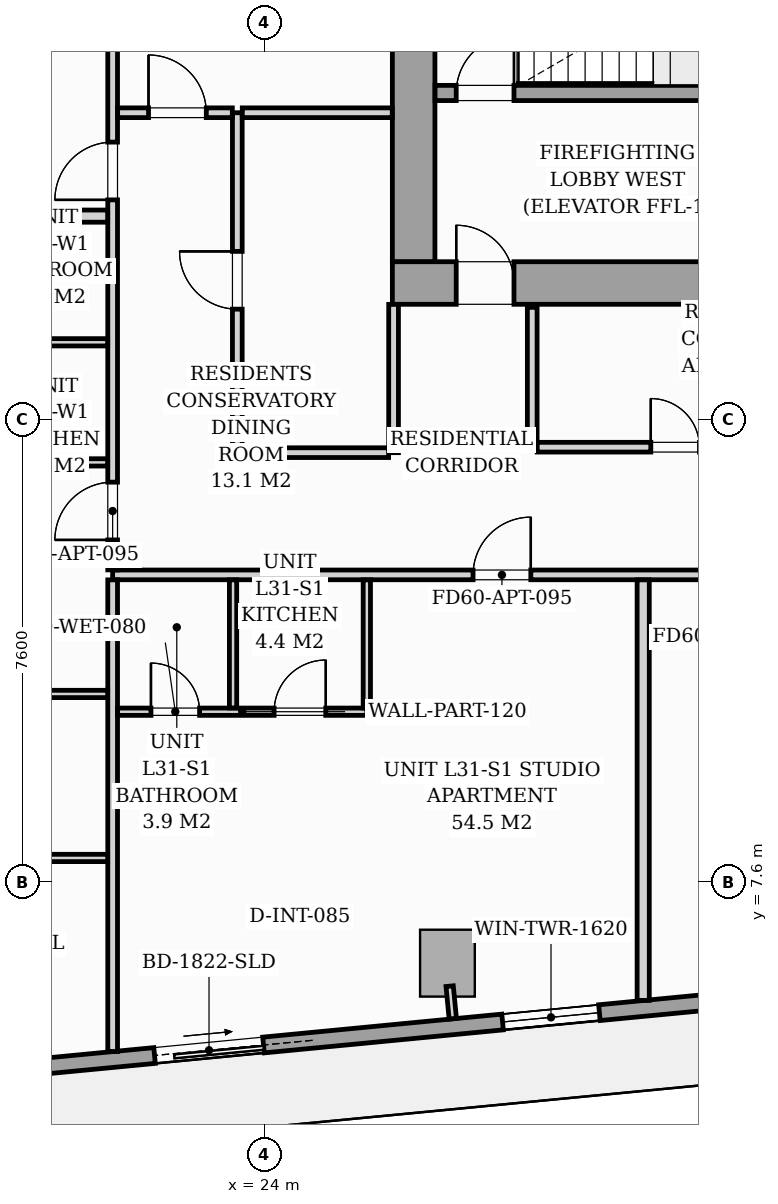
"""IFC4 building model, lengths in metres.
Left out: names, types, materials, properties, quantities, classifications, styles, units other than length and angle.
Written with IfcOpenShell. Run it as: python <this file> out.ifc"""

import sys

from ifc_helpers import new_model, si_unit, direction, frame, frame_2d, origin, origin_2d, place, context, subcontext, project, spatial, rectangle, i_section, extrude, source, transform, mapped, element, fill, save


model = new_model("IFC4")
c1 = context("Model", 3, precision=1e-05, world=origin(), true_north=direction((0.0, 1.0)))
c2 = subcontext(c1, "Body", "Model", "MODEL_VIEW")
j1 = project(units=[si_unit("LENGTHUNIT", "METRE"), si_unit("PLANEANGLEUNIT", "RADIAN")], contexts=[c1])
p1 = place(None, origin())
s1 = spatial("IfcSite", under=j1, at=p1, CompositionType="ELEMENT")
p2 = place(p1, origin())
s2 = spatial("IfcBuilding", under=s1, at=p2, CompositionType="ELEMENT")
p3 = place(p2, frame((0.0, 0.0, 109.8)))
s3 = spatial("IfcBuildingStorey", under=s2, at=p3, CompositionType="ELEMENT", Elevation=109.8)
m1 = source(origin(), c2, "Body", "SweptSolid", [
    extrude(i_section(OverallWidth=0.427, OverallDepth=0.483, WebThickness=0.051, FlangeThickness=0.082, FilletRadius=0.018, at=origin_2d()), origin(), (0.0, 0.0, 1.0), 3.196),
])
p4 = place(p3, frame((26.4, 17.4, 0.002), z_axis=(0.0, 0.0, 1.0), x_axis=(1.0, 0.0, 0.0)))
e1 = element("IfcColumn", 1, at=p4, inside=s3, PredefinedType="PILASTER", context=c2, shape_type="MappedRepresentation", body=[
    mapped(m1, transform((0.0, 0.0, 0.0), scale=1.0)),
])
m2 = source(origin(), c2, "Body", "SweptSolid", [
    extrude(rectangle(XDim=0.9, YDim=1.1, at=origin_2d()), origin(), (0.0, 0.0, 1.0), 3.196),
])
p5 = place(p3, frame((27.006, 6.265, 0.002), z_axis=(0.0, 0.0, 1.0), x_axis=(0.995396198367, 0.09584575252, 0.0)))
e2 = element("IfcColumn", 2, at=p5, inside=s3, PredefinedType="COLUMN", context=c2, shape_type="MappedRepresentation", body=[
    mapped(m2, transform((0.0, 0.0, 0.0), scale=1.0)),
])
p6 = place(p3, frame((31.994, 5.69, 0.0), z_axis=(0.0, 0.0, 1.0), x_axis=(-0.995396521236, -0.095842399342, 0.0)))
e3 = element("IfcWall", 3, at=p6, inside=s3, PredefinedType="STANDARD", context=c2, shape_type="SweptSolid", body=[
    extrude(rectangle(XDim=19.11, YDim=0.26, at=frame_2d((9.555, 0.0))), origin(), (0.0, 0.0, 1.0), 2.94),
])
p7 = place(p6, frame((8.05, 0.0, 0.0)))
e4 = element("IfcOpeningElement", 4, at=p7, cuts=e3, PredefinedType="OPENING", context=c2, shape_type="SweptSolid", body=[
    extrude(rectangle(XDim=1.8, YDim=2.06, at=frame_2d((0.9, 1.03))), frame((0.0, 0.14, 0.0), z_axis=(0.0, -1.0, 0.0), x_axis=(1.0, 0.0, 0.0)), (0.0, 0.0, 1.0), 0.28),
])
p8 = place(p6, frame((2.5, 0.0, 0.65)))
e5 = element("IfcOpeningElement", 5, at=p8, cuts=e3, PredefinedType="OPENING", context=c2, shape_type="SweptSolid", body=[
    extrude(rectangle(XDim=1.6, YDim=1.5, at=frame_2d((0.8, 0.75))), frame((0.0, 0.14, 0.0), z_axis=(0.0, -1.0, 0.0), x_axis=(1.0, 0.0, 0.0)), (0.0, 0.0, 1.0), 0.28),
])
p9 = place(p3, frame((26.1, 17.45, 0.0), z_axis=(0.0, 0.0, 1.0), x_axis=(1.0, 0.0, 0.0)))
e6 = element("IfcWall", 6, at=p9, inside=s3, PredefinedType="SHEAR", context=c2, shape_type="SweptSolid", body=[
    extrude(rectangle(XDim=19.8, YDim=0.7, at=frame_2d((9.9, 0.0))), origin(), (0.0, 0.0, 1.0), 3.2),
])
p10 = place(p9, frame((1.05, 0.0, 0.0)))
e7 = element("IfcOpeningElement", 7, at=p10, cuts=e6, PredefinedType="OPENING", context=c2, shape_type="SweptSolid", body=[
    extrude(rectangle(XDim=0.95, YDim=2.06, at=frame_2d((0.475, 1.03))), frame((0.0, 0.36, 0.0), z_axis=(0.0, -1.0, 0.0), x_axis=(1.0, 0.0, 0.0)), (0.0, 0.0, 1.0), 0.72),
])
p11 = place(p9, frame((9.48, 0.0, 0.0)))
e8 = element("IfcOpeningElement", 8, at=p11, cuts=e6, PredefinedType="OPENING", context=c2, shape_type="SweptSolid", body=[
    extrude(rectangle(XDim=0.85, YDim=2.0, at=frame_2d((0.425, 1.0))), frame((0.0, 0.36, 0.0), z_axis=(0.0, -1.0, 0.0), x_axis=(1.0, 0.0, 0.0)), (0.0, 0.0, 1.0), 0.72),
])
p12 = place(p9, frame((17.65, 0.0, 0.0)))
e9 = element("IfcOpeningElement", 9, at=p12, cuts=e6, PredefinedType="OPENING", context=c2, shape_type="SweptSolid", body=[
    extrude(rectangle(XDim=0.95, YDim=2.06, at=frame_2d((0.475, 1.03))), frame((0.0, 0.36, 0.0), z_axis=(0.0, -1.0, 0.0), x_axis=(1.0, 0.0, 0.0)), (0.0, 0.0, 1.0), 0.72),
])
p13 = place(p3, frame((26.45, 17.802, 0.0), z_axis=(0.0, 0.0, 1.0), x_axis=(0.0, 1.0, 0.0)))
e10 = element("IfcWall", 10, at=p13, inside=s3, PredefinedType="SHEAR", context=c2, shape_type="SweptSolid", body=[
    extrude(rectangle(XDim=5.796, YDim=0.7, at=frame_2d((2.898, 0.0))), origin(), (0.0, 0.0, 1.0), 3.2),
])
p14 = place(p3, frame((26.802, 20.575, 0.0), z_axis=(0.0, 0.0, 1.0), x_axis=(1.0, 0.0, 0.0)))
e11 = element("IfcWall", 11, at=p14, inside=s3, PredefinedType="SOLIDWALL", context=c2, shape_type="SweptSolid", body=[
    extrude(rectangle(XDim=8.148, YDim=0.25, at=frame_2d((4.074, 0.0))), origin(), (0.0, 0.0, 1.0), 3.2),
])
p15 = place(p14, frame((0.348, 0.0, 0.0)))
e12 = element("IfcOpeningElement", 12, at=p15, cuts=e11, PredefinedType="OPENING", context=c2, shape_type="SweptSolid", body=[
    extrude(rectangle(XDim=0.95, YDim=2.06, at=frame_2d((0.475, 1.03))), frame((0.0, 0.135, 0.0), z_axis=(0.0, -1.0, 0.0), x_axis=(1.0, 0.0, 0.0)), (0.0, 0.0, 1.0), 0.27),
])
p16 = place(p3, frame((28.4, 14.75, 0.0), z_axis=(0.0, 0.0, 1.0), x_axis=(0.0, 1.0, 0.0)))
e13 = element("IfcWall", 13, at=p16, inside=s3, PredefinedType="PARTITIONING", context=c2, shape_type="SweptSolid", body=[
    extrude(rectangle(XDim=2.3, YDim=0.16, at=frame_2d((1.15, 0.0))), origin(), (0.0, 0.0, 1.0), 2.94),
])
p17 = place(p3, frame((28.482, 14.75, 0.0), z_axis=(0.0, 0.0, 1.0), x_axis=(1.0, 0.0, 0.0)))
e14 = element("IfcWall", 14, at=p17, inside=s3, PredefinedType="PARTITIONING", context=c2, shape_type="SweptSolid", body=[
    extrude(rectangle(XDim=4.516, YDim=0.16, at=frame_2d((2.258, 0.0))), origin(), (0.0, 0.0, 1.0), 2.94),
])
p18 = place(p17, frame((1.868, 0.0, 0.0)))
e15 = element("IfcOpeningElement", 15, at=p18, cuts=e14, PredefinedType="OPENING", context=c2, shape_type="SweptSolid", body=[
    extrude(rectangle(XDim=0.8, YDim=2.05, at=frame_2d((0.4, 1.025))), frame((0.0, 0.09, 0.0), z_axis=(0.0, -1.0, 0.0), x_axis=(1.0, 0.0, 0.0)), (0.0, 0.0, 1.0), 0.18),
])
p19 = place(p3, frame((21.5, 12.65, 0.0), z_axis=(0.0, 0.0, 1.0), x_axis=(1.0, 0.0, 0.0)))
e16 = element("IfcWall", 16, at=p19, inside=s3, PredefinedType="PARTITIONING", context=c2, shape_type="SweptSolid", body=[
    extrude(rectangle(XDim=26.2, YDim=0.16, at=frame_2d((13.1, 0.0))), origin(), (0.0, 0.0, 1.0), 2.94),
])
p20 = place(p19, frame((5.927, 0.0, 0.0)))
e17 = element("IfcOpeningElement", 17, at=p20, cuts=e16, PredefinedType="OPENING", context=c2, shape_type="SweptSolid", body=[
    extrude(rectangle(XDim=0.95, YDim=2.06, at=frame_2d((0.475, 1.03))), frame((0.0, 0.09, 0.0), z_axis=(0.0, -1.0, 0.0), x_axis=(1.0, 0.0, 0.0)), (0.0, 0.0, 1.0), 0.18),
])
p21 = place(p19, frame((10.575, 0.0, 0.0)))
e18 = element("IfcOpeningElement", 18, at=p21, cuts=e16, PredefinedType="OPENING", context=c2, shape_type="SweptSolid", body=[
    extrude(rectangle(XDim=0.95, YDim=2.06, at=frame_2d((0.475, 1.03))), frame((0.0, 0.09, 0.0), z_axis=(0.0, -1.0, 0.0), x_axis=(1.0, 0.0, 0.0)), (0.0, 0.0, 1.0), 0.18),
])
p22 = place(p19, frame((19.322, 0.0, 0.0)))
e19 = element("IfcOpeningElement", 19, at=p22, cuts=e16, PredefinedType="OPENING", context=c2, shape_type="SweptSolid", body=[
    extrude(rectangle(XDim=0.95, YDim=2.06, at=frame_2d((0.475, 1.03))), frame((0.0, 0.09, 0.0), z_axis=(0.0, -1.0, 0.0), x_axis=(1.0, 0.0, 0.0)), (0.0, 0.0, 1.0), 0.18),
])
p23 = place(p3, frame((21.5, 4.812, 0.0), z_axis=(0.0, 0.0, 1.0), x_axis=(0.0, 1.0, 0.0)))
e20 = element("IfcWall", 20, at=p23, inside=s3, PredefinedType="PARTITIONING", context=c2, shape_type="SweptSolid", body=[
    extrude(rectangle(XDim=7.756, YDim=0.16, at=frame_2d((3.878, 0.0))), origin(), (0.0, 0.0, 1.0), 2.94),
])
p24 = place(p3, frame((21.5, 12.732, 0.0), z_axis=(0.0, 0.0, 1.0), x_axis=(0.0, 1.0, 0.0)))
e21 = element("IfcWall", 21, at=p24, inside=s3, PredefinedType="PARTITIONING", context=c2, shape_type="SweptSolid", body=[
    extrude(rectangle(XDim=11.647, YDim=0.16, at=frame_2d((5.823, 0.0))), origin(), (0.0, 0.0, 1.0), 2.94),
])
p25 = place(p24, frame((0.493, 0.0, 0.0)))
e22 = element("IfcOpeningElement", 22, at=p25, cuts=e21, PredefinedType="OPENING", context=c2, shape_type="SweptSolid", body=[
    extrude(rectangle(XDim=0.95, YDim=2.06, at=frame_2d((0.475, 1.03))), frame((0.0, 0.09, 0.0), z_axis=(0.0, -1.0, 0.0), x_axis=(1.0, 0.0, 0.0)), (0.0, 0.0, 1.0), 0.18),
])
p26 = place(p24, frame((6.085, 0.0, 0.0)))
e23 = element("IfcOpeningElement", 23, at=p26, cuts=e21, PredefinedType="OPENING", context=c2, shape_type="SweptSolid", body=[
    extrude(rectangle(XDim=0.95, YDim=2.06, at=frame_2d((0.475, 1.03))), frame((0.0, 0.09, 0.0), z_axis=(0.0, -1.0, 0.0), x_axis=(1.0, 0.0, 0.0)), (0.0, 0.0, 1.0), 0.18),
])
p27 = place(p3, frame((21.582, 10.4, 0.0), z_axis=(0.0, 0.0, 1.0), x_axis=(1.0, 0.0, 0.0)))
e24 = element("IfcWall", 24, at=p27, inside=s3, PredefinedType="PARTITIONING", context=c2, shape_type="SweptSolid", body=[
    extrude(rectangle(XDim=4.098, YDim=0.12, at=frame_2d((2.049, 0.0))), origin(), (0.0, 0.0, 1.0), 2.94),
])
p28 = place(p27, frame((0.548, 0.0, 0.0)))
e25 = element("IfcOpeningElement", 25, at=p28, cuts=e24, PredefinedType="OPENING", context=c2, shape_type="SweptSolid", body=[
    extrude(rectangle(XDim=0.8, YDim=2.02, at=frame_2d((0.4, 1.01))), frame((0.0, 0.07, 0.0), z_axis=(0.0, -1.0, 0.0), x_axis=(1.0, 0.0, 0.0)), (0.0, 0.0, 1.0), 0.14),
])
p29 = place(p27, frame((2.573, 0.0, 0.0)))
e26 = element("IfcOpeningElement", 26, at=p29, cuts=e24, PredefinedType="OPENING", context=c2, shape_type="SweptSolid", body=[
    extrude(rectangle(XDim=0.85, YDim=2.05, at=frame_2d((0.425, 1.025))), frame((0.0, 0.07, 0.0), z_axis=(0.0, -1.0, 0.0), x_axis=(1.0, 0.0, 0.0)), (0.0, 0.0, 1.0), 0.14),
])
for number, where, z_axis, x_axis in (
    (27, (25.68, 10.462, 0.0), (0.0, 0.0, 1.0), (0.0, 1.0, 0.0)),
    (28, (23.48, 10.462, 0.0), (0.0, 0.0, 1.0), (0.0, 1.0, 0.0)),
):
    element("IfcWall", number, at=place(p3, frame(where, z_axis=z_axis, x_axis=x_axis)), inside=s3, PredefinedType="PARTITIONING", context=c2, shape_type="SweptSolid", body=[
        extrude(rectangle(XDim=2.106, YDim=0.12, at=frame_2d((1.053, 0.0))), origin(), (0.0, 0.0, 1.0), 2.94),
    ])
p30 = place(p3, frame((30.225, 5.653, 0.0), z_axis=(0.0, 0.0, 1.0), x_axis=(0.0, 1.0, 0.0)))
e29 = element("IfcWall", 29, at=p30, inside=s3, PredefinedType="PARTITIONING", context=c2, shape_type="SweptSolid", body=[
    extrude(rectangle(XDim=6.916, YDim=0.2, at=frame_2d((3.458, 0.0))), origin(), (0.0, 0.0, 1.0), 2.94),
])
p31 = place(p3, frame((9.126, 18.55, 0.0), z_axis=(0.0, 0.0, 1.0), x_axis=(1.0, 0.0, 0.0)))
e30 = element("IfcWall", 30, at=p31, inside=s3, PredefinedType="PARTITIONING", context=c2, shape_type="SweptSolid", body=[
    extrude(rectangle(XDim=12.292, YDim=0.2, at=frame_2d((6.146, 0.0))), origin(), (0.0, 0.0, 1.0), 2.94),
])
for number, where, z_axis, x_axis in (
    (31, (19.162, 16.475, 0.0), (0.0, 0.0, 1.0), (1.0, 0.0, 0.0)),
    (32, (19.162, 14.5, 0.0), (0.0, 0.0, 1.0), (1.0, 0.0, 0.0)),
):
    element("IfcWall", number, at=place(p3, frame(where, z_axis=z_axis, x_axis=x_axis)), inside=s3, PredefinedType="PARTITIONING", context=c2, shape_type="SweptSolid", body=[
        extrude(rectangle(XDim=2.256, YDim=0.12, at=frame_2d((1.128, 0.0))), origin(), (0.0, 0.0, 1.0), 2.94),
    ])
p32 = place(p3, frame((12.377, 7.995, 0.0), z_axis=(0.0, 0.0, 1.0), x_axis=(1.0, 0.0, 0.0)))
e33 = element("IfcWall", 33, at=p32, inside=s3, PredefinedType="PARTITIONING", context=c2, shape_type="SweptSolid", body=[
    extrude(rectangle(XDim=9.041, YDim=0.12, at=frame_2d((4.521, 0.0))), origin(), (0.0, 0.0, 1.0), 2.94),
])
p33 = place(p32, frame((4.096, 0.0, 0.0)))
e34 = element("IfcOpeningElement", 34, at=p33, cuts=e33, PredefinedType="OPENING", context=c2, shape_type="SweptSolid", body=[
    extrude(rectangle(XDim=0.85, YDim=2.05, at=frame_2d((0.425, 1.025))), frame((0.0, 0.07, 0.0), z_axis=(0.0, -1.0, 0.0), x_axis=(1.0, 0.0, 0.0)), (0.0, 0.0, 1.0), 0.14),
])
p34 = place(p3, frame((12.377, 10.692, 0.0), z_axis=(0.0, 0.0, 1.0), x_axis=(1.0, 0.0, 0.0)))
e35 = element("IfcWall", 35, at=p34, inside=s3, PredefinedType="PARTITIONING", context=c2, shape_type="SweptSolid", body=[
    extrude(rectangle(XDim=9.041, YDim=0.12, at=frame_2d((4.521, 0.0))), origin(), (0.0, 0.0, 1.0), 2.94),
])
p35 = place(p34, frame((4.096, 0.0, 0.0)))
e36 = element("IfcOpeningElement", 36, at=p35, cuts=e35, PredefinedType="OPENING", context=c2, shape_type="SweptSolid", body=[
    extrude(rectangle(XDim=0.85, YDim=2.05, at=frame_2d((0.425, 1.025))), frame((0.0, 0.07, 0.0), z_axis=(0.0, -1.0, 0.0), x_axis=(1.0, 0.0, 0.0)), (0.0, 0.0, 1.0), 0.14),
])
p36 = place(p3, frame((23.55, 14.66, 0.0), z_axis=(0.0, 0.0, 1.0), x_axis=(0.0, 1.0, 0.0)))
e37 = element("IfcWall", 37, at=p36, inside=s3, PredefinedType="PARTITIONING", context=c2, shape_type="SweptSolid", body=[
    extrude(rectangle(XDim=5.59, YDim=0.16, at=frame_2d((2.795, 0.0))), origin(), (0.0, 0.0, 1.0), 2.94),
])
p37 = place(p36, frame((2.36, 0.0, 0.0)))
e38 = element("IfcOpeningElement", 38, at=p37, cuts=e37, PredefinedType="OPENING", context=c2, shape_type="SweptSolid", body=[
    extrude(rectangle(XDim=0.95, YDim=2.06, at=frame_2d((0.475, 1.03))), frame((0.0, 0.09, 0.0), z_axis=(0.0, -1.0, 0.0), x_axis=(1.0, 0.0, 0.0)), (0.0, 0.0, 1.0), 0.18),
])
p38 = place(p3, frame((21.582, 20.25, 0.0), z_axis=(0.0, 0.0, 1.0), x_axis=(1.0, 0.0, 0.0)))
e39 = element("IfcWall", 39, at=p38, inside=s3, PredefinedType="PARTITIONING", context=c2, shape_type="SweptSolid", body=[
    extrude(rectangle(XDim=1.886, YDim=0.16, at=frame_2d((0.943, 0.0))), origin(), (0.0, 0.0, 1.0), 2.94),
])
p39 = place(p38, frame((0.508, 0.0, 0.0)))
e40 = element("IfcOpeningElement", 40, at=p39, cuts=e39, PredefinedType="OPENING", context=c2, shape_type="SweptSolid", body=[
    extrude(rectangle(XDim=0.95, YDim=2.06, at=frame_2d((0.475, 1.03))), frame((0.0, 0.09, 0.0), z_axis=(0.0, -1.0, 0.0), x_axis=(1.0, 0.0, 0.0)), (0.0, 0.0, 1.0), 0.18),
])
p40 = place(p3, frame((23.632, 20.25, 0.0), z_axis=(0.0, 0.0, 1.0), x_axis=(1.0, 0.0, 0.0)))
e41 = element("IfcWall", 41, at=p40, inside=s3, PredefinedType="PARTITIONING", context=c2, shape_type="SweptSolid", body=[
    extrude(rectangle(XDim=2.466, YDim=0.16, at=frame_2d((1.233, 0.0))), origin(), (0.0, 0.0, 1.0), 2.94),
])
p41 = place(p3, frame((26.12, 14.66, 0.0), z_axis=(0.0, 0.0, 1.0), x_axis=(0.0, 1.0, 0.0)))
e42 = element("IfcWall", 42, at=p41, inside=s3, PredefinedType="PARTITIONING", context=c2, shape_type="SweptSolid", body=[
    extrude(rectangle(XDim=2.438, YDim=0.16, at=frame_2d((1.219, 0.0))), origin(), (0.0, 0.0, 1.0), 2.94),
])
p42 = place(p3, frame((23.632, 14.66, 0.0), z_axis=(0.0, 0.0, 1.0), x_axis=(1.0, 0.0, 0.0)))
e43 = element("IfcWall", 43, at=p42, inside=s3, PredefinedType="PARTITIONING", context=c2, shape_type="SweptSolid", body=[
    extrude(rectangle(XDim=2.406, YDim=0.16, at=frame_2d((1.203, 0.0))), origin(), (0.0, 0.0, 1.0), 2.94),
])
p43 = place(p3, frame((27.042, 5.887, 0.0), z_axis=(0.0, 0.0, 1.0), x_axis=(0.096222656154, -0.995359834654, 0.0)))
e44 = element("IfcWall", 44, at=p43, inside=s3, PredefinedType="PARTITIONING", context=c2, shape_type="SweptSolid", body=[
    extrude(rectangle(XDim=0.538, YDim=0.12, at=frame_2d((0.269, 0.0))), origin(), (0.0, 0.0, 1.0), 2.94),
])
m3 = source(origin(), c2, "Body", "SweptSolid", [
    extrude(rectangle(XDim=1.8, YDim=2.06, at=frame_2d((0.9, 1.03))), frame((0.0, 0.025, 0.0), z_axis=(0.0, -1.0, 0.0), x_axis=(1.0, 0.0, 0.0)), (0.0, 0.0, 1.0), 0.05),
])
p44 = place(p7, origin())
e45 = element("IfcDoor", 45, at=p44, inside=s3, OperationType="SLIDING_TO_LEFT", PredefinedType="DOOR", context=c2, shape_type="MappedRepresentation", body=[
    mapped(m3, transform((0.0, 0.0, 0.0), scale=1.0)),
])
fill(e4, e45)
m4 = source(origin(), c2, "Body", "SweptSolid", [
    extrude(rectangle(XDim=1.6, YDim=1.5, at=frame_2d((0.8, 0.75))), frame((0.0, 0.03, 0.0), z_axis=(0.0, -1.0, 0.0), x_axis=(1.0, 0.0, 0.0)), (0.0, 0.0, 1.0), 0.06),
])
p45 = place(p8, origin())
e46 = element("IfcWindow", 46, at=p45, inside=s3, PartitioningType="SINGLE_PANEL", PredefinedType="WINDOW", context=c2, shape_type="MappedRepresentation", body=[
    mapped(m4, transform((0.0, 0.0, 0.0), scale=1.0)),
])
fill(e5, e46)
m5 = source(origin(), c2, "Body", "SweptSolid", [
    extrude(rectangle(XDim=0.95, YDim=2.06, at=frame_2d((0.475, 1.03))), frame((0.0, 0.025, 0.0), z_axis=(0.0, -1.0, 0.0), x_axis=(1.0, 0.0, 0.0)), (0.0, 0.0, 1.0), 0.05),
])
p46 = place(p10, origin())
e47 = element("IfcDoor", 47, at=p46, inside=s3, OperationType="SINGLE_SWING_LEFT", PredefinedType="DOOR", context=c2, shape_type="MappedRepresentation", body=[
    mapped(m5, transform((0.0, 0.0, 0.0), scale=1.0)),
])
fill(e7, e47)
p47 = place(p15, origin())
e48 = element("IfcDoor", 48, at=p47, inside=s3, OperationType="SINGLE_SWING_RIGHT", PredefinedType="DOOR", context=c2, shape_type="MappedRepresentation", body=[
    mapped(m5, transform((0.0, 0.0, 0.0), scale=1.0)),
])
fill(e12, e48)
m6 = source(origin(), c2, "Body", "SweptSolid", [
    extrude(rectangle(XDim=0.8, YDim=2.05, at=frame_2d((0.4, 1.025))), frame((0.0, 0.025, 0.0), z_axis=(0.0, -1.0, 0.0), x_axis=(1.0, 0.0, 0.0)), (0.0, 0.0, 1.0), 0.05),
])
p48 = place(p18, origin())
e49 = element("IfcDoor", 49, at=p48, inside=s3, OperationType="SINGLE_SWING_LEFT", PredefinedType="DOOR", context=c2, shape_type="MappedRepresentation", body=[
    mapped(m6, transform((0.0, 0.0, 0.0), scale=1.0)),
])
fill(e15, e49)
m7 = source(origin(), c2, "Body", "SweptSolid", [
    extrude(rectangle(XDim=0.95, YDim=2.06, at=frame_2d((0.475, 1.03))), frame((0.0, 0.025, 0.0), z_axis=(0.0, -1.0, 0.0), x_axis=(1.0, 0.0, 0.0)), (0.0, 0.0, 1.0), 0.05),
])
p49 = place(p20, origin())
e50 = element("IfcDoor", 50, at=p49, inside=s3, OperationType="SINGLE_SWING_RIGHT", PredefinedType="DOOR", context=c2, shape_type="MappedRepresentation", body=[
    mapped(m7, transform((0.0, 0.0, 0.0), scale=1.0)),
])
fill(e17, e50)
m8 = source(origin(), c2, "Body", "SweptSolid", [
    extrude(rectangle(XDim=0.8, YDim=2.02, at=frame_2d((0.4, 1.01))), frame((0.0, 0.025, 0.0), z_axis=(0.0, -1.0, 0.0), x_axis=(1.0, 0.0, 0.0)), (0.0, 0.0, 1.0), 0.05),
])
p50 = place(p28, origin())
e51 = element("IfcDoor", 51, at=p50, inside=s3, OperationType="SINGLE_SWING_LEFT", PredefinedType="DOOR", context=c2, shape_type="MappedRepresentation", body=[
    mapped(m8, transform((0.0, 0.0, 0.0), scale=1.0)),
])
fill(e25, e51)
m9 = source(origin(), c2, "Body", "SweptSolid", [
    extrude(rectangle(XDim=0.85, YDim=2.05, at=frame_2d((0.425, 1.025))), frame((0.0, 0.025, 0.0), z_axis=(0.0, -1.0, 0.0), x_axis=(1.0, 0.0, 0.0)), (0.0, 0.0, 1.0), 0.05),
])
p51 = place(p29, origin())
e52 = element("IfcDoor", 52, at=p51, inside=s3, OperationType="SINGLE_SWING_RIGHT", PredefinedType="DOOR", context=c2, shape_type="MappedRepresentation", body=[
    mapped(m9, transform((0.0, 0.0, 0.0), scale=1.0)),
])
fill(e26, e52)
p52 = place(p25, origin())
e53 = element("IfcDoor", 53, at=p52, inside=s3, OperationType="SINGLE_SWING_LEFT", PredefinedType="DOOR", context=c2, shape_type="MappedRepresentation", body=[
    mapped(m7, transform((0.0, 0.0, 0.0), scale=1.0)),
])
fill(e22, e53)
p53 = place(p26, origin())
e54 = element("IfcDoor", 54, at=p53, inside=s3, OperationType="SINGLE_SWING_LEFT", PredefinedType="DOOR", context=c2, shape_type="MappedRepresentation", body=[
    mapped(m7, transform((0.0, 0.0, 0.0), scale=1.0)),
])
fill(e23, e54)
p54 = place(p37, origin())
e55 = element("IfcDoor", 55, at=p54, inside=s3, OperationType="SINGLE_SWING_RIGHT", PredefinedType="DOOR", context=c2, shape_type="MappedRepresentation", body=[
    mapped(m7, transform((0.0, 0.0, 0.0), scale=1.0)),
])
fill(e38, e55)
p55 = place(p39, origin())
e56 = element("IfcDoor", 56, at=p55, inside=s3, OperationType="SINGLE_SWING_LEFT", PredefinedType="DOOR", context=c2, shape_type="MappedRepresentation", body=[
    mapped(m7, transform((0.0, 0.0, 0.0), scale=1.0)),
])
fill(e40, e56)
save(model, sys.argv[1])
